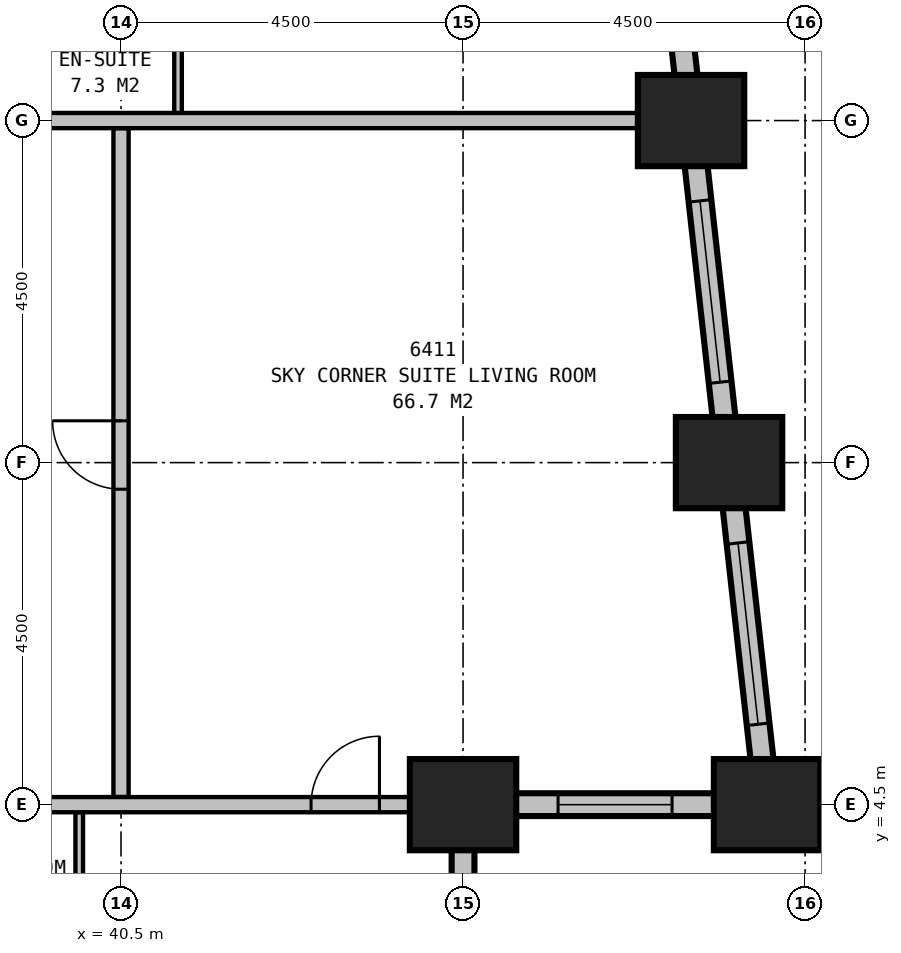
"""IFC4 building model, lengths in metres.
Left out: names, types, materials, properties, quantities, classifications, styles, units other than length and angle.
Written with IfcOpenShell. Run it as: python <this file> out.ifc"""

import sys

from ifc_helpers import new_model, si_unit, direction, frame, frame_2d, origin, origin_2d, place, context, subcontext, project, spatial, rectangle, extrude, element, fill, save


model = new_model("IFC4")
c1 = context("Model", 3, precision=1e-05, world=origin(), true_north=direction((0.0, 1.0)))
c2 = subcontext(c1, "Body", "Model", "MODEL_VIEW")
j1 = project(units=[si_unit("LENGTHUNIT", "METRE"), si_unit("PLANEANGLEUNIT", "RADIAN")], contexts=[c1])
p1 = place(None, origin())
s1 = spatial("IfcSite", under=j1, at=p1, CompositionType="ELEMENT")
p2 = place(p1, origin())
s2 = spatial("IfcBuilding", under=s1, at=p2, CompositionType="ELEMENT")
p3 = place(p2, frame((0.0, 0.0, 250.7)))
s3 = spatial("IfcBuildingStorey", under=s2, at=p3, CompositionType="ELEMENT", Elevation=250.7)
for number, where, z_axis, x_axis in (
    (1, (45.0, 4.5, 0.0), (0.0, 0.0, 1.0), (1.0, 0.0, 0.0)),
    (2, (49.0, 4.5, 0.0), (0.0, 0.0, 1.0), (1.0, 0.0, 0.0)),
    (3, (48.5, 9.0, 0.0), (0.0, 0.0, 1.0), (1.0, 0.0, 0.0)),
    (4, (48.0, 13.5, 0.0), (0.0, 0.0, 1.0), (1.0, 0.0, 0.0)),
):
    element("IfcColumn", number, at=place(p3, frame(where, z_axis=z_axis, x_axis=x_axis)), inside=s3, PredefinedType="COLUMN", context=c2, shape_type="SweptSolid", body=[
        extrude(rectangle(XDim=1.4, YDim=1.2, at=origin_2d()), origin(), (0.0, 0.0, 1.0), 3.9),
    ])
p4 = place(p3, frame((45.0, -0.15, 0.0), z_axis=(0.0, 0.0, 1.0), x_axis=(0.0, 1.0, 0.0)))
e5 = element("IfcWall", 5, at=p4, inside=s3, PredefinedType="STANDARD", context=c2, shape_type="SweptSolid", body=[
    extrude(rectangle(XDim=4.8, YDim=0.3, at=frame_2d((2.4, 0.0))), origin(), (0.0, 0.0, 1.0), 2.65),
])
p5 = place(p4, frame((1.2, 0.0, 0.5)))
e6 = element("IfcOpeningElement", 6, at=p5, cuts=e5, PredefinedType="OPENING", context=c2, shape_type="SweptSolid", body=[
    extrude(rectangle(XDim=2.4, YDim=2.0, at=frame_2d((1.2, 1.0))), frame((0.0, 0.16, 0.0), z_axis=(0.0, -1.0, 0.0), x_axis=(1.0, 0.0, 0.0)), (0.0, 0.0, 1.0), 0.32),
])
p6 = place(p3, frame((44.85, 4.5, 0.0), z_axis=(0.0, 0.0, 1.0), x_axis=(1.0, 0.0, 0.0)))
e7 = element("IfcWall", 7, at=p6, inside=s3, PredefinedType="STANDARD", context=c2, shape_type="SweptSolid", body=[
    extrude(rectangle(XDim=4.3, YDim=0.3, at=frame_2d((2.15, 0.0))), origin(), (0.0, 0.0, 1.0), 2.65),
])
p7 = place(p6, frame((1.4, 0.0, 0.5)))
e8 = element("IfcOpeningElement", 8, at=p7, cuts=e7, PredefinedType="OPENING", context=c2, shape_type="SweptSolid", body=[
    extrude(rectangle(XDim=1.5, YDim=2.0, at=frame_2d((0.75, 1.0))), frame((0.0, 0.16, 0.0), z_axis=(0.0, -1.0, 0.0), x_axis=(1.0, 0.0, 0.0)), (0.0, 0.0, 1.0), 0.32),
])
p8 = place(p3, frame((49.017, 4.351, 0.0), z_axis=(0.0, 0.0, 1.0), x_axis=(-0.110433201132, 0.993883548555, 0.0)))
e9 = element("IfcWall", 9, at=p8, inside=s3, PredefinedType="STANDARD", context=c2, shape_type="SweptSolid", body=[
    extrude(rectangle(XDim=31.994, YDim=0.3, at=frame_2d((15.997, 0.0))), origin(), (0.0, 0.0, 1.0), 2.65),
])
p9 = place(p8, frame((1.214, 0.0, 0.5)))
e10 = element("IfcOpeningElement", 10, at=p9, cuts=e9, PredefinedType="OPENING", context=c2, shape_type="SweptSolid", body=[
    extrude(rectangle(XDim=2.4, YDim=2.0, at=frame_2d((1.2, 1.0))), frame((0.0, 0.16, 0.0), z_axis=(0.0, -1.0, 0.0), x_axis=(1.0, 0.0, 0.0)), (0.0, 0.0, 1.0), 0.32),
])
p10 = place(p8, frame((5.742, 0.0, 0.5)))
e11 = element("IfcOpeningElement", 11, at=p10, cuts=e9, PredefinedType="OPENING", context=c2, shape_type="SweptSolid", body=[
    extrude(rectangle(XDim=2.4, YDim=2.0, at=frame_2d((1.2, 1.0))), frame((0.0, 0.16, 0.0), z_axis=(0.0, -1.0, 0.0), x_axis=(1.0, 0.0, 0.0)), (0.0, 0.0, 1.0), 0.32),
])
p11 = place(p8, frame((10.269, 0.0, 0.5)))
e12 = element("IfcOpeningElement", 12, at=p11, cuts=e9, PredefinedType="OPENING", context=c2, shape_type="SweptSolid", body=[
    extrude(rectangle(XDim=2.4, YDim=2.0, at=frame_2d((1.2, 1.0))), frame((0.0, 0.16, 0.0), z_axis=(0.0, -1.0, 0.0), x_axis=(1.0, 0.0, 0.0)), (0.0, 0.0, 1.0), 0.32),
])
p12 = place(p8, frame((14.797, 0.0, 0.5)))
e13 = element("IfcOpeningElement", 13, at=p12, cuts=e9, PredefinedType="OPENING", context=c2, shape_type="SweptSolid", body=[
    extrude(rectangle(XDim=2.4, YDim=2.0, at=frame_2d((1.2, 1.0))), frame((0.0, 0.16, 0.0), z_axis=(0.0, -1.0, 0.0), x_axis=(1.0, 0.0, 0.0)), (0.0, 0.0, 1.0), 0.32),
])
p13 = place(p8, frame((19.325, 0.0, 0.5)))
e14 = element("IfcOpeningElement", 14, at=p13, cuts=e9, PredefinedType="OPENING", context=c2, shape_type="SweptSolid", body=[
    extrude(rectangle(XDim=2.4, YDim=2.0, at=frame_2d((1.2, 1.0))), frame((0.0, 0.16, 0.0), z_axis=(0.0, -1.0, 0.0), x_axis=(1.0, 0.0, 0.0)), (0.0, 0.0, 1.0), 0.32),
])
p14 = place(p8, frame((23.852, 0.0, 0.5)))
e15 = element("IfcOpeningElement", 15, at=p14, cuts=e9, PredefinedType="OPENING", context=c2, shape_type="SweptSolid", body=[
    extrude(rectangle(XDim=2.4, YDim=2.0, at=frame_2d((1.2, 1.0))), frame((0.0, 0.16, 0.0), z_axis=(0.0, -1.0, 0.0), x_axis=(1.0, 0.0, 0.0)), (0.0, 0.0, 1.0), 0.32),
])
p15 = place(p8, frame((28.38, 0.0, 0.5)))
e16 = element("IfcOpeningElement", 16, at=p15, cuts=e9, PredefinedType="OPENING", context=c2, shape_type="SweptSolid", body=[
    extrude(rectangle(XDim=2.4, YDim=2.0, at=frame_2d((1.2, 1.0))), frame((0.0, 0.16, 0.0), z_axis=(0.0, -1.0, 0.0), x_axis=(1.0, 0.0, 0.0)), (0.0, 0.0, 1.0), 0.32),
])
p16 = place(p3, frame((41.25, 13.5, 0.0), z_axis=(0.0, 0.0, 1.0), x_axis=(0.0, 1.0, 0.0)))
e17 = element("IfcWall", 17, at=p16, inside=s3, PredefinedType="PLUMBINGWALL", context=c2, shape_type="SweptSolid", body=[
    extrude(rectangle(XDim=2.8, YDim=0.1, at=frame_2d((1.4, 0.0))), origin(), (0.0, 0.0, 1.0), 3.65),
])
p17 = place(p3, frame((38.3, 13.5, 0.0), z_axis=(0.0, 0.0, 1.0), x_axis=(1.0, 0.0, 0.0)))
e18 = element("IfcWall", 18, at=p17, inside=s3, PredefinedType="PARTITIONING", context=c2, shape_type="SweptSolid", body=[
    extrude(rectangle(XDim=9.921, YDim=0.2, at=frame_2d((4.96, 0.0))), origin(), (0.0, 0.0, 1.0), 2.35),
])
p18 = place(p3, frame((35.9, 4.5, 0.0), z_axis=(0.0, 0.0, 1.0), x_axis=(1.0, 0.0, 0.0)))
e19 = element("IfcWall", 19, at=p18, inside=s3, PredefinedType="PARTITIONING", context=c2, shape_type="SweptSolid", body=[
    extrude(rectangle(XDim=9.1, YDim=0.2, at=frame_2d((4.55, 0.0))), origin(), (0.0, 0.0, 1.0), 3.65),
])
p19 = place(p18, frame((7.1, 0.0, 0.0)))
e20 = element("IfcOpeningElement", 20, at=p19, cuts=e19, PredefinedType="OPENING", context=c2, shape_type="SweptSolid", body=[
    extrude(rectangle(XDim=0.9, YDim=2.1, at=frame_2d((0.45, 1.05))), frame((0.0, 0.11, 0.0), z_axis=(0.0, -1.0, 0.0), x_axis=(1.0, 0.0, 0.0)), (0.0, 0.0, 1.0), 0.22),
])
p20 = place(p3, frame((40.5, 4.6, 0.0), z_axis=(0.0, 0.0, 1.0), x_axis=(0.0, 1.0, 0.0)))
e21 = element("IfcWall", 21, at=p20, inside=s3, PredefinedType="PARTITIONING", context=c2, shape_type="SweptSolid", body=[
    extrude(rectangle(XDim=8.8, YDim=0.2, at=frame_2d((4.4, 0.0))), origin(), (0.0, 0.0, 1.0), 2.75),
])
p21 = place(p20, frame((4.05, 0.0, 0.0)))
e22 = element("IfcOpeningElement", 22, at=p21, cuts=e21, PredefinedType="OPENING", context=c2, shape_type="SweptSolid", body=[
    extrude(rectangle(XDim=0.9, YDim=2.1, at=frame_2d((0.45, 1.05))), frame((0.0, 0.11, 0.0), z_axis=(0.0, -1.0, 0.0), x_axis=(1.0, 0.0, 0.0)), (0.0, 0.0, 1.0), 0.22),
])
p22 = place(p3, frame((39.95, 4.4, 0.0), z_axis=(0.0, 0.0, 1.0), x_axis=(0.0, -1.0, 0.0)))
e23 = element("IfcWall", 23, at=p22, inside=s3, PredefinedType="PLUMBINGWALL", context=c2, shape_type="SweptSolid", body=[
    extrude(rectangle(XDim=2.3, YDim=0.1, at=frame_2d((1.15, 0.0))), origin(), (0.0, 0.0, 1.0), 3.65),
])
p23 = place(p7, origin())
e24 = element("IfcWindow", 24, at=p23, inside=s3, PartitioningType="SINGLE_PANEL", PredefinedType="WINDOW", context=c2, shape_type="SweptSolid", body=[
    extrude(rectangle(XDim=1.5, YDim=2.0, at=frame_2d((0.75, 1.0))), frame((0.0, 0.03, 0.0), z_axis=(0.0, -1.0, 0.0), x_axis=(1.0, 0.0, 0.0)), (0.0, 0.0, 1.0), 0.06),
])
fill(e8, e24)
p24 = place(p9, origin())
e25 = element("IfcWindow", 25, at=p24, inside=s3, PartitioningType="SINGLE_PANEL", PredefinedType="WINDOW", context=c2, shape_type="SweptSolid", body=[
    extrude(rectangle(XDim=2.4, YDim=2.0, at=frame_2d((1.2, 1.0))), frame((0.0, 0.03, 0.0), z_axis=(0.0, -1.0, 0.0), x_axis=(1.0, 0.0, 0.0)), (0.0, 0.0, 1.0), 0.06),
])
fill(e10, e25)
p25 = place(p10, origin())
e26 = element("IfcWindow", 26, at=p25, inside=s3, PartitioningType="SINGLE_PANEL", PredefinedType="WINDOW", context=c2, shape_type="SweptSolid", body=[
    extrude(rectangle(XDim=2.4, YDim=2.0, at=frame_2d((1.2, 1.0))), frame((0.0, 0.03, 0.0), z_axis=(0.0, -1.0, 0.0), x_axis=(1.0, 0.0, 0.0)), (0.0, 0.0, 1.0), 0.06),
])
fill(e11, e26)
p26 = place(p19, origin())
e27 = element("IfcDoor", 27, at=p26, inside=s3, OperationType="SINGLE_SWING_RIGHT", PredefinedType="DOOR", context=c2, shape_type="SweptSolid", body=[
    extrude(rectangle(XDim=0.9, YDim=2.1, at=frame_2d((0.45, 1.05))), frame((0.0, 0.025, 0.0), z_axis=(0.0, -1.0, 0.0), x_axis=(1.0, 0.0, 0.0)), (0.0, 0.0, 1.0), 0.05),
])
fill(e20, e27)
p27 = place(p21, origin())
e28 = element("IfcDoor", 28, at=p27, inside=s3, OperationType="SINGLE_SWING_RIGHT", PredefinedType="DOOR", context=c2, shape_type="SweptSolid", body=[
    extrude(rectangle(XDim=0.9, YDim=2.1, at=frame_2d((0.45, 1.05))), frame((0.0, 0.025, 0.0), z_axis=(0.0, -1.0, 0.0), x_axis=(1.0, 0.0, 0.0)), (0.0, 0.0, 1.0), 0.05),
])
fill(e22, e28)
save(model, sys.argv[1])
